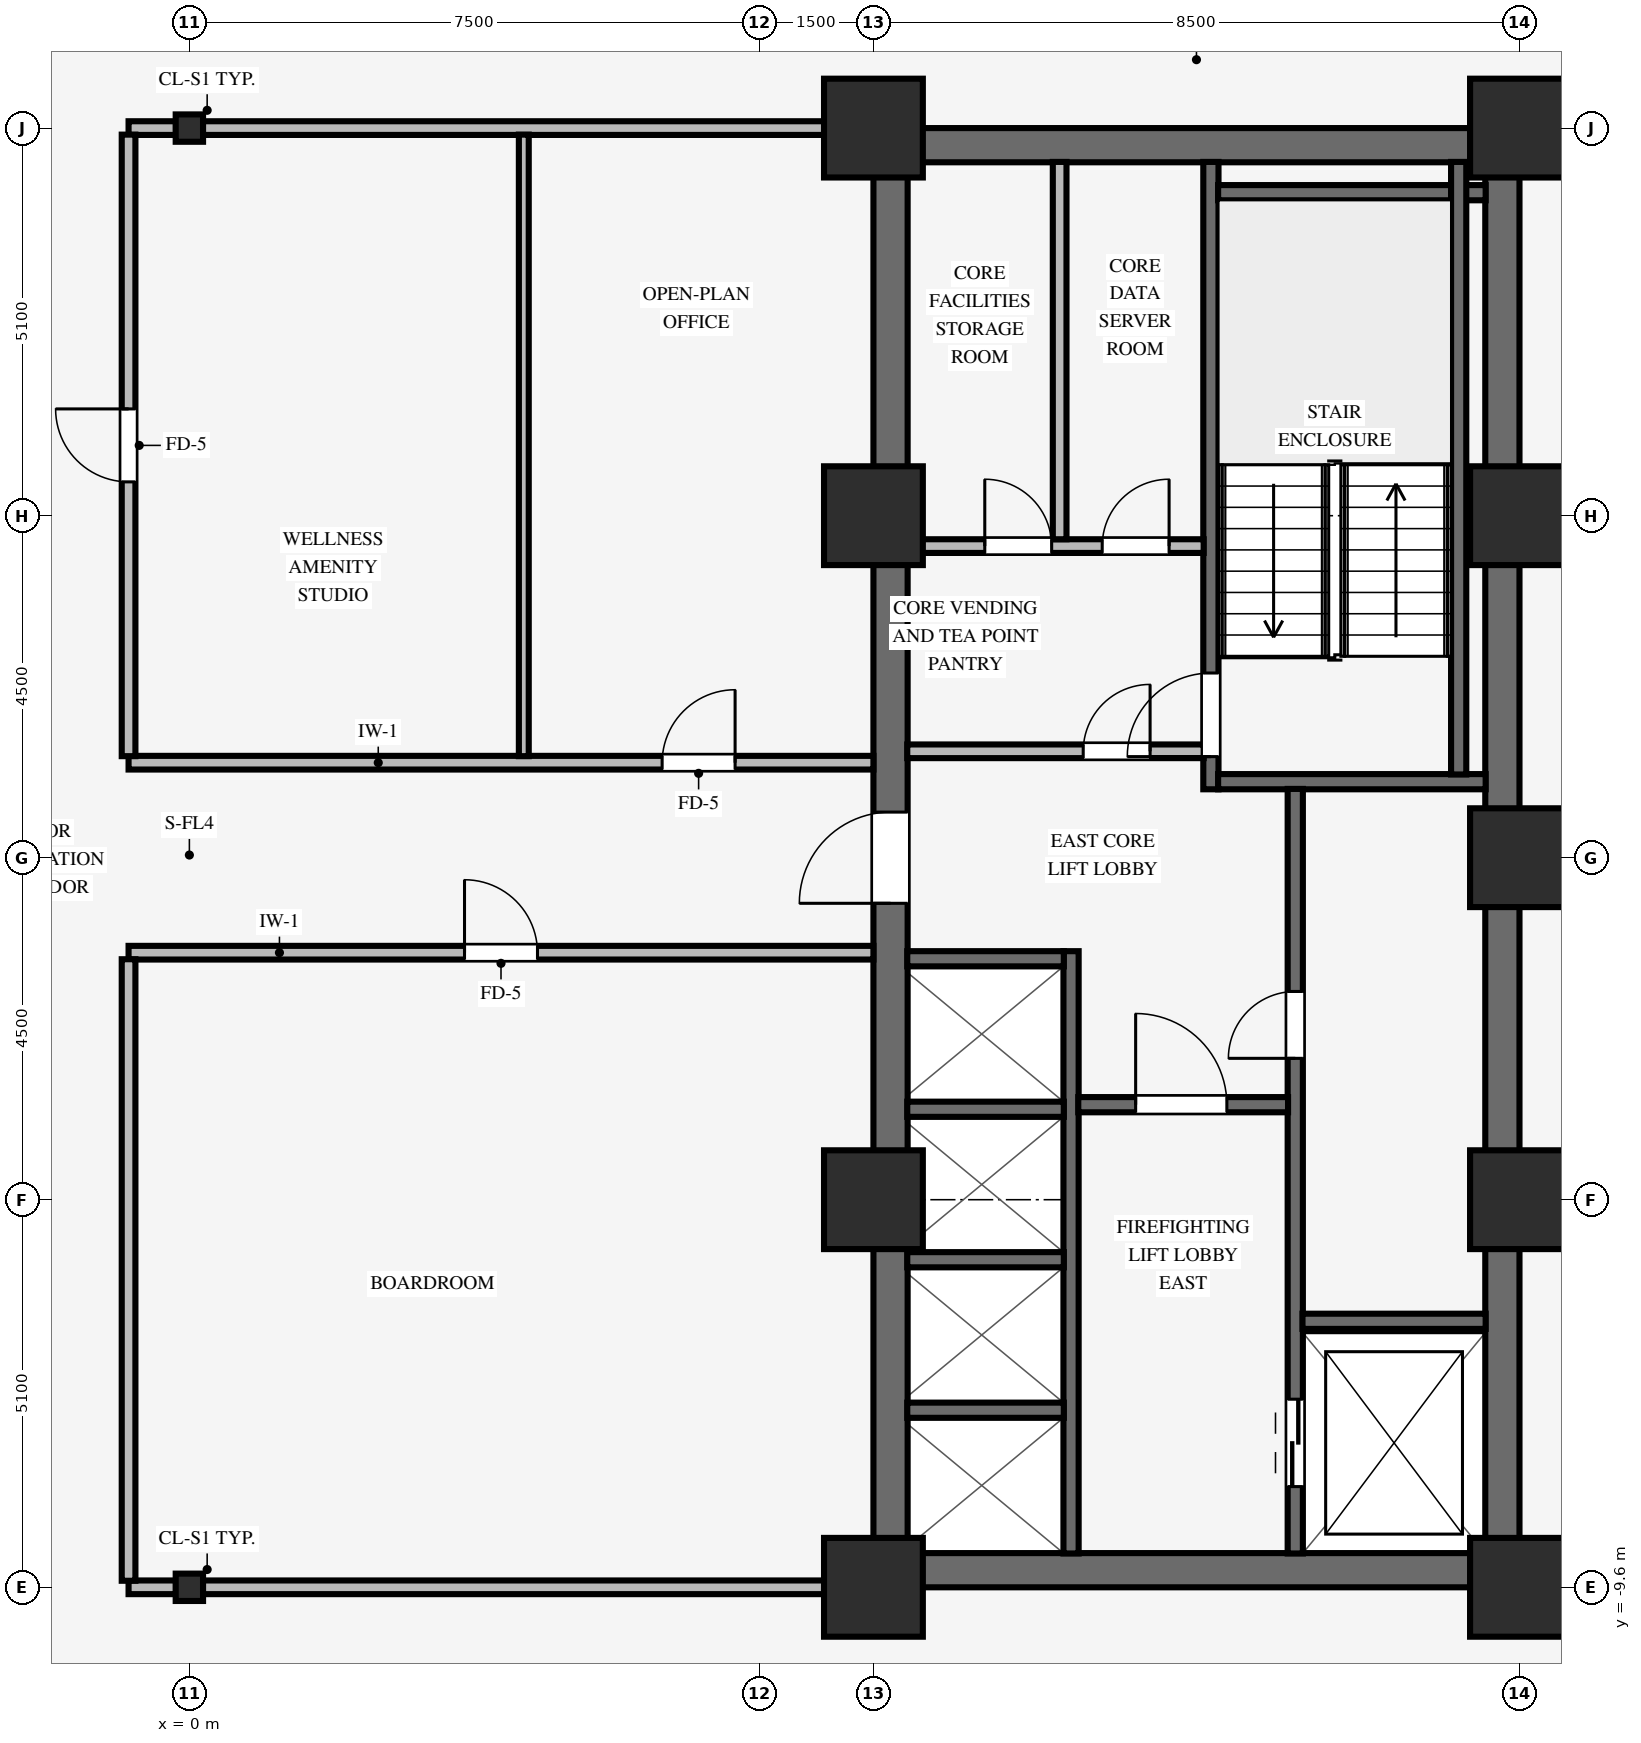
"""IFC4 building model, lengths in metres.
Left out: names, types, materials, properties, quantities, classifications, styles, units other than length and angle.
Written with IfcOpenShell. Run it as: python <this file> out.ifc"""

import sys

from ifc_helpers import new_model, si_unit, direction, frame, frame_2d, origin, origin_2d, place, context, subcontext, project, spatial, rectangle, i_section, extrude, source, transform, mapped, element, fill, save


model = new_model("IFC4")
c1 = context("Model", 3, precision=1e-05, world=origin(), true_north=direction((0.0, 1.0)))
c2 = subcontext(c1, "Body", "Model", "MODEL_VIEW")
j1 = project(units=[si_unit("LENGTHUNIT", "METRE"), si_unit("PLANEANGLEUNIT", "RADIAN")], contexts=[c1])
p1 = place(None, origin())
s1 = spatial("IfcSite", under=j1, at=p1, CompositionType="ELEMENT")
p2 = place(p1, origin())
s2 = spatial("IfcBuilding", under=s1, at=p2, CompositionType="ELEMENT")
p3 = place(p2, frame((0.0, 0.0, 42.2)))
s3 = spatial("IfcBuildingStorey", under=s2, at=p3, CompositionType="ELEMENT", Elevation=42.2)
for number, where, z_axis, x_axis in (
    (1, (9.0, -9.375, 0.0), (0.0, 0.0, 1.0), (1.0, 0.0, 0.0)),
    (2, (9.0, 9.375, 0.0), (0.0, 0.0, 1.0), (1.0, 0.0, 0.0)),
):
    element("IfcWall", number, at=place(p3, frame(where, z_axis=z_axis, x_axis=x_axis)), inside=s3, PredefinedType="SHEAR", context=c2, shape_type="SweptSolid", body=[
        extrude(rectangle(XDim=8.5, YDim=0.45, at=frame_2d((4.25, 0.0))), origin(), (0.0, 0.0, 1.0), 3.37),
    ])
p4 = place(p3, frame((9.225, -9.155, 0.0), z_axis=(0.0, 0.0, 1.0), x_axis=(0.0, 1.0, 0.0)))
e3 = element("IfcWall", 3, at=p4, inside=s3, PredefinedType="SHEAR", context=c2, shape_type="SweptSolid", body=[
    extrude(rectangle(XDim=18.31, YDim=0.45, at=frame_2d((9.155, 0.0))), origin(), (0.0, 0.0, 1.0), 3.37),
])
p5 = place(p4, frame((8.555, 0.0, 0.0)))
e4 = element("IfcOpeningElement", 4, at=p5, cuts=e3, PredefinedType="OPENING", context=c2, shape_type="SweptSolid", body=[
    extrude(rectangle(XDim=1.2, YDim=2.15, at=frame_2d((0.6, 1.075))), frame((0.0, 0.235, 0.0), z_axis=(0.0, -1.0, 0.0), x_axis=(1.0, 0.0, 0.0)), (0.0, 0.0, 1.0), 0.47),
])
p6 = place(p3, frame((17.275, -9.155, 0.0), z_axis=(0.0, 0.0, 1.0), x_axis=(0.0, 1.0, 0.0)))
e5 = element("IfcWall", 5, at=p6, inside=s3, PredefinedType="SHEAR", context=c2, shape_type="SweptSolid", body=[
    extrude(rectangle(XDim=18.31, YDim=0.45, at=frame_2d((9.155, 0.0))), origin(), (0.0, 0.0, 1.0), 3.37),
])
for number, where, z_axis, x_axis in (
    (6, (9.0, -9.6, 0.0), (0.0, 0.0, 1.0), (1.0, 0.0, 0.0)),
    (7, (9.0, -4.5, 0.0), (0.0, 0.0, 1.0), (1.0, 0.0, 0.0)),
    (8, (9.0, 4.5, 0.0), (0.0, 0.0, 1.0), (1.0, 0.0, 0.0)),
    (9, (9.0, 9.6, 0.0), (0.0, 0.0, 1.0), (1.0, 0.0, 0.0)),
    (10, (17.5, -9.6, 0.0), (0.0, 0.0, 1.0), (1.0, 0.0, 0.0)),
    (11, (17.5, -4.5, 0.0), (0.0, 0.0, 1.0), (1.0, 0.0, 0.0)),
    (12, (17.5, 4.5, 0.0), (0.0, 0.0, 1.0), (1.0, 0.0, 0.0)),
    (13, (17.5, 9.6, 0.0), (0.0, 0.0, 1.0), (1.0, 0.0, 0.0)),
    (14, (17.5, 0.0, 0.0), (0.0, 0.0, 1.0), (1.0, 0.0, 0.0)),
):
    element("IfcColumn", number, at=place(p3, frame(where, z_axis=z_axis, x_axis=x_axis)), inside=s3, PredefinedType="COLUMN", context=c2, shape_type="SweptSolid", body=[
        extrude(rectangle(XDim=1.3, YDim=1.3, at=origin_2d()), origin(), (0.0, 0.0, 1.0), 3.37),
    ])
for number, where, z_axis, x_axis in (
    (15, (0.0, -9.6, 0.0), (0.0, 0.0, 1.0), (1.0, 0.0, 0.0)),
    (16, (0.0, 9.6, 0.0), (0.0, 0.0, 1.0), (1.0, 0.0, 0.0)),
):
    element("IfcColumn", number, at=place(p3, frame(where, z_axis=z_axis, x_axis=x_axis)), inside=s3, PredefinedType="COLUMN", context=c2, shape_type="SweptSolid", body=[
        extrude(i_section(OverallWidth=0.36, OverallDepth=0.36, WebThickness=0.021, FlangeThickness=0.021, FilletRadius=0.018, at=origin_2d()), origin(), (0.0, 0.0, 1.0), 3.37),
    ])
p7 = place(p3, frame((13.44, 0.9, 0.0), z_axis=(0.0, 0.0, 1.0), x_axis=(0.0, 1.0, 0.0)))
e17 = element("IfcWall", 17, at=p7, inside=s3, PredefinedType="SHEAR", context=c2, shape_type="SweptSolid", body=[
    extrude(rectangle(XDim=8.255, YDim=0.2, at=frame_2d((4.127, 0.0))), origin(), (0.0, 0.0, 1.0), 3.37),
])
p8 = place(p7, frame((0.43, 0.0, 0.0)))
e18 = element("IfcOpeningElement", 18, at=p8, cuts=e17, PredefinedType="OPENING", context=c2, shape_type="SweptSolid", body=[
    extrude(rectangle(XDim=1.1, YDim=2.15, at=frame_2d((0.55, 1.075))), frame((0.0, 0.11, 0.0), z_axis=(0.0, -1.0, 0.0), x_axis=(1.0, 0.0, 0.0)), (0.0, 0.0, 1.0), 0.22),
])
for number, where, z_axis, x_axis in (
    (19, (13.535, 1.0, 0.0), (0.0, 0.0, 1.0), (1.0, 0.0, 0.0)),
    (20, (13.535, 8.75, 0.0), (0.0, 0.0, 1.0), (1.0, 0.0, 0.0)),
):
    element("IfcWall", number, at=place(p3, frame(where, z_axis=z_axis, x_axis=x_axis)), inside=s3, PredefinedType="SHEAR", context=c2, shape_type="SweptSolid", body=[
        extrude(rectangle(XDim=3.52, YDim=0.2, at=frame_2d((1.76, 0.0))), origin(), (0.0, 0.0, 1.0), 3.37),
    ])
p9 = place(p3, frame((16.7, 1.095, 0.0), z_axis=(0.0, 0.0, 1.0), x_axis=(0.0, 1.0, 0.0)))
e21 = element("IfcWall", 21, at=p9, inside=s3, PredefinedType="SHEAR", context=c2, shape_type="SweptSolid", body=[
    extrude(rectangle(XDim=8.06, YDim=0.2, at=frame_2d((4.03, 0.0))), origin(), (0.0, 0.0, 1.0), 3.37),
])
p10 = place(p3, frame((14.55, -9.155, 0.0), z_axis=(0.0, 0.0, 1.0), x_axis=(0.0, 1.0, 0.0)))
e22 = element("IfcWall", 22, at=p10, inside=s3, PredefinedType="SHEAR", context=c2, shape_type="SweptSolid", body=[
    extrude(rectangle(XDim=10.06, YDim=0.2, at=frame_2d((5.03, 0.0))), origin(), (0.0, 0.0, 1.0), 3.37),
])
p11 = place(p10, frame((6.515, 0.0, 0.0)))
e23 = element("IfcOpeningElement", 23, at=p11, cuts=e22, PredefinedType="OPENING", context=c2, shape_type="SweptSolid", body=[
    extrude(rectangle(XDim=0.88, YDim=2.1, at=frame_2d((0.44, 1.05))), frame((0.0, 0.11, 0.0), z_axis=(0.0, -1.0, 0.0), x_axis=(1.0, 0.0, 0.0)), (0.0, 0.0, 1.0), 0.22),
])
p12 = place(p10, frame((0.88, 0.0, 0.0)))
e24 = element("IfcOpeningElement", 24, at=p12, cuts=e22, PredefinedType="OPENING", context=c2, shape_type="SweptSolid", body=[
    extrude(rectangle(XDim=1.15, YDim=2.15, at=frame_2d((0.575, 1.075))), frame((0.0, 0.11, 0.0), z_axis=(0.0, -1.0, 0.0), x_axis=(1.0, 0.0, 0.0)), (0.0, 0.0, 1.0), 0.22),
])
p13 = place(p3, frame((14.645, -6.1, 0.0), z_axis=(0.0, 0.0, 1.0), x_axis=(1.0, 0.0, 0.0)))
e25 = element("IfcWall", 25, at=p13, inside=s3, PredefinedType="SHEAR", context=c2, shape_type="SweptSolid", body=[
    extrude(rectangle(XDim=2.41, YDim=0.2, at=frame_2d((1.205, 0.0))), origin(), (0.0, 0.0, 1.0), 3.37),
])
p14 = place(p3, frame((11.6, -9.155, 0.0), z_axis=(0.0, 0.0, 1.0), x_axis=(0.0, 1.0, 0.0)))
e26 = element("IfcWall", 26, at=p14, inside=s3, PredefinedType="SHEAR", context=c2, shape_type="SweptSolid", body=[
    extrude(rectangle(XDim=7.925, YDim=0.2, at=frame_2d((3.962, 0.0))), origin(), (0.0, 0.0, 1.0), 3.37),
])
p15 = place(p3, frame((11.695, -3.25, 0.0), z_axis=(0.0, 0.0, 1.0), x_axis=(1.0, 0.0, 0.0)))
e27 = element("IfcWall", 27, at=p15, inside=s3, PredefinedType="SHEAR", context=c2, shape_type="SweptSolid", body=[
    extrude(rectangle(XDim=2.76, YDim=0.2, at=frame_2d((1.38, 0.0))), origin(), (0.0, 0.0, 1.0), 3.37),
])
p16 = place(p15, frame((0.755, 0.0, 0.0)))
e28 = element("IfcOpeningElement", 28, at=p16, cuts=e27, PredefinedType="OPENING", context=c2, shape_type="SweptSolid", body=[
    extrude(rectangle(XDim=1.2, YDim=2.15, at=frame_2d((0.6, 1.075))), frame((0.0, 0.11, 0.0), z_axis=(0.0, -1.0, 0.0), x_axis=(1.0, 0.0, 0.0)), (0.0, 0.0, 1.0), 0.22),
])
for number, where, z_axis, x_axis in (
    (29, (9.445, -7.27, 0.0), (0.0, 0.0, 1.0), (1.0, 0.0, 0.0)),
    (30, (9.445, -5.29, 0.0), (0.0, 0.0, 1.0), (1.0, 0.0, 0.0)),
    (31, (9.445, -3.31, 0.0), (0.0, 0.0, 1.0), (1.0, 0.0, 0.0)),
    (32, (9.445, -1.33, 0.0), (0.0, 0.0, 1.0), (1.0, 0.0, 0.0)),
):
    element("IfcWall", number, at=place(p3, frame(where, z_axis=z_axis, x_axis=x_axis)), inside=s3, PredefinedType="SHEAR", context=c2, shape_type="SweptSolid", body=[
        extrude(rectangle(XDim=2.06, YDim=0.2, at=frame_2d((1.03, 0.0))), origin(), (0.0, 0.0, 1.0), 3.37),
    ])
p17 = place(p3, frame((9.445, 1.4, 0.0), z_axis=(0.0, 0.0, 1.0), x_axis=(1.0, 0.0, 0.0)))
e33 = element("IfcWall", 33, at=p17, inside=s3, PredefinedType="PARTITIONING", context=c2, shape_type="SweptSolid", body=[
    extrude(rectangle(XDim=3.9, YDim=0.18, at=frame_2d((1.95, 0.0))), origin(), (0.0, 0.0, 1.0), 3.36),
])
p18 = place(p17, frame((2.315, 0.0, 0.0)))
e34 = element("IfcOpeningElement", 34, at=p18, cuts=e33, PredefinedType="OPENING", context=c2, shape_type="SweptSolid", body=[
    extrude(rectangle(XDim=0.88, YDim=2.1, at=frame_2d((0.44, 1.05))), frame((0.0, 0.1, 0.0), z_axis=(0.0, -1.0, 0.0), x_axis=(1.0, 0.0, 0.0)), (0.0, 0.0, 1.0), 0.2),
])
p19 = place(p3, frame((9.445, 4.1, 0.0), z_axis=(0.0, 0.0, 1.0), x_axis=(1.0, 0.0, 0.0)))
e35 = element("IfcWall", 35, at=p19, inside=s3, PredefinedType="PARTITIONING", context=c2, shape_type="SweptSolid", body=[
    extrude(rectangle(XDim=3.9, YDim=0.18, at=frame_2d((1.95, 0.0))), origin(), (0.0, 0.0, 1.0), 3.36),
])
p20 = place(p19, frame((1.02, 0.0, 0.0)))
e36 = element("IfcOpeningElement", 36, at=p20, cuts=e35, PredefinedType="OPENING", context=c2, shape_type="SweptSolid", body=[
    extrude(rectangle(XDim=0.88, YDim=2.1, at=frame_2d((0.44, 1.05))), frame((0.0, 0.1, 0.0), z_axis=(0.0, -1.0, 0.0), x_axis=(1.0, 0.0, 0.0)), (0.0, 0.0, 1.0), 0.2),
])
p21 = place(p19, frame((2.565, 0.0, 0.0)))
e37 = element("IfcOpeningElement", 37, at=p21, cuts=e35, PredefinedType="OPENING", context=c2, shape_type="SweptSolid", body=[
    extrude(rectangle(XDim=0.88, YDim=2.1, at=frame_2d((0.44, 1.05))), frame((0.0, 0.1, 0.0), z_axis=(0.0, -1.0, 0.0), x_axis=(1.0, 0.0, 0.0)), (0.0, 0.0, 1.0), 0.2),
])
p22 = place(p3, frame((11.45, 4.19, 0.0), z_axis=(0.0, 0.0, 1.0), x_axis=(0.0, 1.0, 0.0)))
e38 = element("IfcWall", 38, at=p22, inside=s3, PredefinedType="PARTITIONING", context=c2, shape_type="SweptSolid", body=[
    extrude(rectangle(XDim=4.965, YDim=0.18, at=frame_2d((2.482, 0.0))), origin(), (0.0, 0.0, 1.0), 3.36),
])
p23 = place(p3, frame((-0.8, -9.6, 0.0), z_axis=(0.0, 0.0, 1.0), x_axis=(1.0, 0.0, 0.0)))
e39 = element("IfcWall", 39, at=p23, inside=s3, PredefinedType="PARTITIONING", context=c2, shape_type="SweptSolid", body=[
    extrude(rectangle(XDim=0.624, YDim=0.18, at=frame_2d((0.312, 0.0))), origin(), (0.0, 0.0, 1.0), 2.405),
])
p24 = place(p3, frame((0.176, -9.6, 0.0), z_axis=(0.0, 0.0, 1.0), x_axis=(1.0, 0.0, 0.0)))
e40 = element("IfcWall", 40, at=p24, inside=s3, PredefinedType="PARTITIONING", context=c2, shape_type="SweptSolid", body=[
    extrude(rectangle(XDim=8.178, YDim=0.18, at=frame_2d((4.089, 0.0))), origin(), (0.0, 0.0, 1.0), 2.405),
])
p25 = place(p3, frame((-0.8, -1.25, 0.0), z_axis=(0.0, 0.0, 1.0), x_axis=(1.0, 0.0, 0.0)))
e41 = element("IfcWall", 41, at=p25, inside=s3, PredefinedType="PARTITIONING", context=c2, shape_type="SweptSolid", body=[
    extrude(rectangle(XDim=9.8, YDim=0.18, at=frame_2d((4.9, 0.0))), origin(), (0.0, 0.0, 1.0), 3.36),
])
p26 = place(p25, frame((4.42, 0.0, 0.0)))
e42 = element("IfcOpeningElement", 42, at=p26, cuts=e41, PredefinedType="OPENING", context=c2, shape_type="SweptSolid", body=[
    extrude(rectangle(XDim=0.96, YDim=2.1, at=frame_2d((0.48, 1.05))), frame((0.0, 0.1, 0.0), z_axis=(0.0, -1.0, 0.0), x_axis=(1.0, 0.0, 0.0)), (0.0, 0.0, 1.0), 0.2),
])
p27 = place(p3, frame((-0.8, 1.25, 0.0), z_axis=(0.0, 0.0, 1.0), x_axis=(1.0, 0.0, 0.0)))
e43 = element("IfcWall", 43, at=p27, inside=s3, PredefinedType="PARTITIONING", context=c2, shape_type="SweptSolid", body=[
    extrude(rectangle(XDim=9.8, YDim=0.18, at=frame_2d((4.9, 0.0))), origin(), (0.0, 0.0, 1.0), 3.36),
])
p28 = place(p27, frame((7.02, 0.0, 0.0)))
e44 = element("IfcOpeningElement", 44, at=p28, cuts=e43, PredefinedType="OPENING", context=c2, shape_type="SweptSolid", body=[
    extrude(rectangle(XDim=0.96, YDim=2.1, at=frame_2d((0.48, 1.05))), frame((0.0, 0.1, 0.0), z_axis=(0.0, -1.0, 0.0), x_axis=(1.0, 0.0, 0.0)), (0.0, 0.0, 1.0), 0.2),
])
p29 = place(p3, frame((-0.8, 9.6, 0.0), z_axis=(0.0, 0.0, 1.0), x_axis=(1.0, 0.0, 0.0)))
e45 = element("IfcWall", 45, at=p29, inside=s3, PredefinedType="PARTITIONING", context=c2, shape_type="SweptSolid", body=[
    extrude(rectangle(XDim=0.624, YDim=0.18, at=frame_2d((0.312, 0.0))), origin(), (0.0, 0.0, 1.0), 2.405),
])
p30 = place(p3, frame((0.176, 9.6, 0.0), z_axis=(0.0, 0.0, 1.0), x_axis=(1.0, 0.0, 0.0)))
e46 = element("IfcWall", 46, at=p30, inside=s3, PredefinedType="PARTITIONING", context=c2, shape_type="SweptSolid", body=[
    extrude(rectangle(XDim=8.178, YDim=0.18, at=frame_2d((4.089, 0.0))), origin(), (0.0, 0.0, 1.0), 2.405),
])
p31 = place(p3, frame((-0.8, -9.514, 0.0), z_axis=(0.0, 0.0, 1.0), x_axis=(0.0, 1.0, 0.0)))
e47 = element("IfcWall", 47, at=p31, inside=s3, PredefinedType="PARTITIONING", context=c2, shape_type="SweptSolid", body=[
    extrude(rectangle(XDim=8.178, YDim=0.18, at=frame_2d((4.089, 0.0))), origin(), (0.0, 0.0, 1.0), 3.36),
])
p32 = place(p3, frame((-0.8, 1.336, 0.0), z_axis=(0.0, 0.0, 1.0), x_axis=(0.0, 1.0, 0.0)))
e48 = element("IfcWall", 48, at=p32, inside=s3, PredefinedType="PARTITIONING", context=c2, shape_type="SweptSolid", body=[
    extrude(rectangle(XDim=8.178, YDim=0.18, at=frame_2d((4.089, 0.0))), origin(), (0.0, 0.0, 1.0), 3.36),
])
p33 = place(p32, frame((3.609, 0.0, 0.0)))
e49 = element("IfcOpeningElement", 49, at=p33, cuts=e48, PredefinedType="OPENING", context=c2, shape_type="SweptSolid", body=[
    extrude(rectangle(XDim=0.96, YDim=2.1, at=frame_2d((0.48, 1.05))), frame((0.0, 0.1, 0.0), z_axis=(0.0, -1.0, 0.0), x_axis=(1.0, 0.0, 0.0)), (0.0, 0.0, 1.0), 0.2),
])
p34 = place(p3, frame((4.4, 1.336, 0.0), z_axis=(0.0, 0.0, 1.0), x_axis=(0.0, 1.0, 0.0)))
e50 = element("IfcWall", 50, at=p34, inside=s3, PredefinedType="PARTITIONING", context=c2, shape_type="SweptSolid", body=[
    extrude(rectangle(XDim=8.178, YDim=0.13, at=frame_2d((4.089, 0.0))), origin(), (0.0, 0.0, 1.0), 3.36),
])
m1 = source(origin(), c2, "Body", "SweptSolid", [
    extrude(rectangle(XDim=1.1, YDim=2.15, at=frame_2d((0.55, 1.075))), frame((0.0, 0.025, 0.0), z_axis=(0.0, -1.0, 0.0), x_axis=(1.0, 0.0, 0.0)), (0.0, 0.0, 1.0), 0.05),
])
p35 = place(p8, origin())
e51 = element("IfcDoor", 51, at=p35, inside=s3, OperationType="SINGLE_SWING_LEFT", PredefinedType="DOOR", context=c2, shape_type="MappedRepresentation", body=[
    mapped(m1, transform((0.0, 0.0, 0.0), scale=1.0)),
])
fill(e18, e51)
m2 = source(origin(), c2, "Body", "SweptSolid", [
    extrude(rectangle(XDim=0.88, YDim=2.1, at=frame_2d((0.44, 1.05))), frame((0.0, 0.025, 0.0), z_axis=(0.0, -1.0, 0.0), x_axis=(1.0, 0.0, 0.0)), (0.0, 0.0, 1.0), 0.05),
])
p36 = place(p11, origin())
e52 = element("IfcDoor", 52, at=p36, inside=s3, OperationType="SINGLE_SWING_LEFT", PredefinedType="DOOR", context=c2, shape_type="MappedRepresentation", body=[
    mapped(m2, transform((0.0, 0.0, 0.0), scale=1.0)),
])
fill(e23, e52)
m3 = source(origin(), c2, "Body", "SweptSolid", [
    extrude(rectangle(XDim=1.2, YDim=2.15, at=frame_2d((0.6, 1.075))), frame((0.0, 0.025, 0.0), z_axis=(0.0, -1.0, 0.0), x_axis=(1.0, 0.0, 0.0)), (0.0, 0.0, 1.0), 0.05),
])
p37 = place(p16, origin())
e53 = element("IfcDoor", 53, at=p37, inside=s3, OperationType="SINGLE_SWING_LEFT", PredefinedType="DOOR", context=c2, shape_type="MappedRepresentation", body=[
    mapped(m3, transform((0.0, 0.0, 0.0), scale=1.0)),
])
fill(e28, e53)
p38 = place(p5, origin())
e54 = element("IfcDoor", 54, at=p38, inside=s3, OperationType="SINGLE_SWING_LEFT", PredefinedType="DOOR", context=c2, shape_type="MappedRepresentation", body=[
    mapped(m3, transform((0.0, 0.0, 0.0), scale=1.0)),
])
fill(e4, e54)
p39 = place(p18, origin())
e55 = element("IfcDoor", 55, at=p39, inside=s3, OperationType="SINGLE_SWING_RIGHT", PredefinedType="DOOR", context=c2, shape_type="MappedRepresentation", body=[
    mapped(m2, transform((0.0, 0.0, 0.0), scale=1.0)),
])
fill(e34, e55)
p40 = place(p20, origin())
e56 = element("IfcDoor", 56, at=p40, inside=s3, OperationType="SINGLE_SWING_LEFT", PredefinedType="DOOR", context=c2, shape_type="MappedRepresentation", body=[
    mapped(m2, transform((0.0, 0.0, 0.0), scale=1.0)),
])
fill(e36, e56)
p41 = place(p21, origin())
e57 = element("IfcDoor", 57, at=p41, inside=s3, OperationType="SINGLE_SWING_RIGHT", PredefinedType="DOOR", context=c2, shape_type="MappedRepresentation", body=[
    mapped(m2, transform((0.0, 0.0, 0.0), scale=1.0)),
])
fill(e37, e57)
m4 = source(origin(), c2, "Body", "SweptSolid", [
    extrude(rectangle(XDim=1.15, YDim=2.15, at=frame_2d((0.575, 1.075))), frame((0.0, 0.025, 0.0), z_axis=(0.0, -1.0, 0.0), x_axis=(1.0, 0.0, 0.0)), (0.0, 0.0, 1.0), 0.05),
])
p42 = place(p12, origin())
e58 = element("IfcDoor", 58, at=p42, inside=s3, OperationType="DOUBLE_DOOR_SLIDING", PredefinedType="DOOR", context=c2, shape_type="MappedRepresentation", body=[
    mapped(m4, transform((0.0, 0.0, 0.0), scale=1.0)),
])
fill(e24, e58)
m5 = source(origin(), c2, "Body", "SweptSolid", [
    extrude(rectangle(XDim=0.96, YDim=2.1, at=frame_2d((0.48, 1.05))), frame((0.0, 0.025, 0.0), z_axis=(0.0, -1.0, 0.0), x_axis=(1.0, 0.0, 0.0)), (0.0, 0.0, 1.0), 0.05),
])
p43 = place(p26, origin())
e59 = element("IfcDoor", 59, at=p43, inside=s3, OperationType="SINGLE_SWING_LEFT", PredefinedType="DOOR", context=c2, shape_type="MappedRepresentation", body=[
    mapped(m5, transform((0.0, 0.0, 0.0), scale=1.0)),
])
fill(e42, e59)
p44 = place(p33, origin())
e60 = element("IfcDoor", 60, at=p44, inside=s3, OperationType="SINGLE_SWING_RIGHT", PredefinedType="DOOR", context=c2, shape_type="MappedRepresentation", body=[
    mapped(m5, transform((0.0, 0.0, 0.0), scale=1.0)),
])
fill(e49, e60)
p45 = place(p28, origin())
e61 = element("IfcDoor", 61, at=p45, inside=s3, OperationType="SINGLE_SWING_RIGHT", PredefinedType="DOOR", context=c2, shape_type="MappedRepresentation", body=[
    mapped(m5, transform((0.0, 0.0, 0.0), scale=1.0)),
])
fill(e44, e61)
save(model, sys.argv[1])
